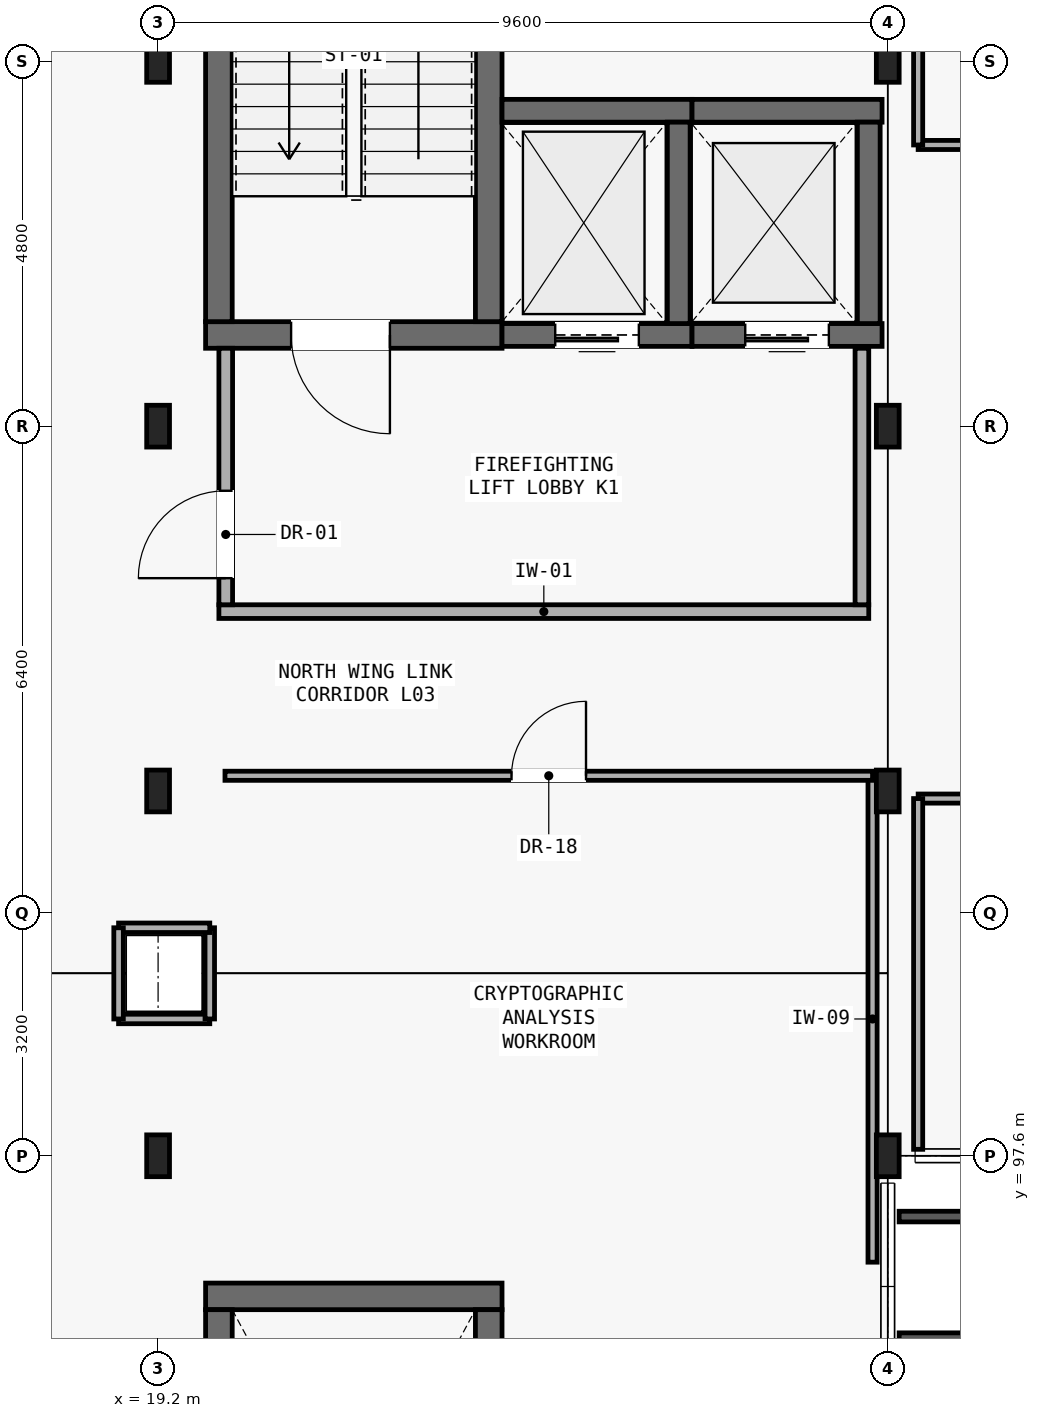
"""IFC4 building model, lengths in metres.
Left out: names, types, materials, properties, quantities, classifications, styles, units other than length and angle.
Written with IfcOpenShell. Run it as: python <this file> out.ifc"""

import sys

from ifc_helpers import new_model, si_unit, direction, frame, frame_2d, origin, origin_2d, place, context, subcontext, project, spatial, rectangle, i_section, extrude, element, fill, save


model = new_model("IFC4")
c1 = context("Model", 3, precision=1e-05, world=origin(), true_north=direction((0.0, 1.0)))
c2 = subcontext(c1, "Body", "Model", "MODEL_VIEW")
j1 = project(units=[si_unit("LENGTHUNIT", "METRE"), si_unit("PLANEANGLEUNIT", "RADIAN")], contexts=[c1])
p1 = place(None, origin())
s1 = spatial("IfcSite", under=j1, at=p1, CompositionType="ELEMENT")
p2 = place(p1, origin())
s2 = spatial("IfcBuilding", under=s1, at=p2, CompositionType="ELEMENT")
p3 = place(p2, frame((0.0, 0.0, 13.65)))
s3 = spatial("IfcBuildingStorey", under=s2, at=p3, CompositionType="ELEMENT", Elevation=13.65)
for number, where, z_axis, x_axis in (
    (1, (28.8, 97.6, 0.0), (0.0, 0.0, 1.0), (1.0, 0.0, 0.0)),
    (2, (28.8, 102.4, 0.0), (0.0, 0.0, 1.0), (1.0, 0.0, 0.0)),
    (3, (28.8, 107.2, 0.0), (0.0, 0.0, 1.0), (1.0, 0.0, 0.0)),
    (4, (28.8, 112.0, 0.0), (0.0, 0.0, 1.0), (1.0, 0.0, 0.0)),
    (5, (19.2, 97.6, 0.0), (0.0, 0.0, 1.0), (1.0, 0.0, 0.0)),
    (6, (19.2, 102.4, 0.0), (0.0, 0.0, 1.0), (1.0, 0.0, 0.0)),
    (7, (19.2, 107.2, 0.0), (0.0, 0.0, 1.0), (1.0, 0.0, 0.0)),
    (8, (19.2, 112.0, 0.0), (0.0, 0.0, 1.0), (1.0, 0.0, 0.0)),
):
    element("IfcColumn", number, at=place(p3, frame(where, z_axis=z_axis, x_axis=x_axis)), inside=s3, PredefinedType="COLUMN", context=c2, shape_type="SweptSolid", body=[
        extrude(i_section(OverallWidth=0.3, OverallDepth=0.55, WebThickness=0.015, FlangeThickness=0.029, FilletRadius=0.027, at=origin_2d()), origin(), (0.0, 0.0, 1.0), 4.2),
    ])
p4 = place(p3, frame((19.825, 108.4, 0.0), z_axis=(0.0, 0.0, 1.0), x_axis=(1.0, 0.0, 0.0)))
e9 = element("IfcWall", 9, at=p4, inside=s3, PredefinedType="SHEAR", context=c2, shape_type="SweptSolid", body=[
    extrude(rectangle(XDim=3.9, YDim=0.35, at=frame_2d((1.95, 0.0))), origin(), (0.0, 0.0, 1.0), 3.98),
])
p5 = place(p4, frame((1.125, 0.0, 0.0)))
e10 = element("IfcOpeningElement", 10, at=p5, cuts=e9, PredefinedType="OPENING", context=c2, shape_type="SweptSolid", body=[
    extrude(rectangle(XDim=1.3, YDim=2.15, at=frame_2d((0.65, 1.075))), frame((0.0, 0.185, 0.0), z_axis=(0.0, -1.0, 0.0), x_axis=(1.0, 0.0, 0.0)), (0.0, 0.0, 1.0), 0.37),
])
for number, where, z_axis, x_axis in (
    (11, (20.0, 108.575, 0.0), (0.0, 0.0, 1.0), (0.0, 1.0, 0.0)),
    (12, (23.55, 108.575, 0.0), (0.0, 0.0, 1.0), (0.0, 1.0, 0.0)),
):
    element("IfcWall", number, at=place(p3, frame(where, z_axis=z_axis, x_axis=x_axis)), inside=s3, PredefinedType="SHEAR", context=c2, shape_type="SweptSolid", body=[
        extrude(rectangle(XDim=7.6, YDim=0.35, at=frame_2d((3.8, 0.0))), origin(), (0.0, 0.0, 1.0), 3.98),
    ])
p6 = place(p3, frame((23.725, 108.4, 0.0), z_axis=(0.0, 0.0, 1.0), x_axis=(1.0, 0.0, 0.0)))
e13 = element("IfcWall", 13, at=p6, inside=s3, PredefinedType="SHEAR", context=c2, shape_type="SweptSolid", body=[
    extrude(rectangle(XDim=2.5, YDim=0.3, at=frame_2d((1.25, 0.0))), origin(), (0.0, 0.0, 1.0), 3.98),
])
p7 = place(p6, frame((0.7, 0.0, 0.0)))
e14 = element("IfcOpeningElement", 14, at=p7, cuts=e13, PredefinedType="OPENING", context=c2, shape_type="SweptSolid", body=[
    extrude(rectangle(XDim=1.1, YDim=2.1, at=frame_2d((0.55, 1.05))), frame((0.0, 0.16, 0.0), z_axis=(0.0, -1.0, 0.0), x_axis=(1.0, 0.0, 0.0)), (0.0, 0.0, 1.0), 0.32),
])
p8 = place(p3, frame((23.725, 111.35, 0.0), z_axis=(0.0, 0.0, 1.0), x_axis=(1.0, 0.0, 0.0)))
e15 = element("IfcWall", 15, at=p8, inside=s3, PredefinedType="SHEAR", context=c2, shape_type="SweptSolid", body=[
    extrude(rectangle(XDim=2.5, YDim=0.3, at=frame_2d((1.25, 0.0))), origin(), (0.0, 0.0, 1.0), 3.98),
])
p9 = place(p3, frame((26.05, 108.55, 0.0), z_axis=(0.0, 0.0, 1.0), x_axis=(0.0, 1.0, 0.0)))
e16 = element("IfcWall", 16, at=p9, inside=s3, PredefinedType="SHEAR", context=c2, shape_type="SweptSolid", body=[
    extrude(rectangle(XDim=2.65, YDim=0.3, at=frame_2d((1.325, 0.0))), origin(), (0.0, 0.0, 1.0), 3.98),
])
p10 = place(p3, frame((26.225, 108.4, 0.0), z_axis=(0.0, 0.0, 1.0), x_axis=(1.0, 0.0, 0.0)))
e17 = element("IfcWall", 17, at=p10, inside=s3, PredefinedType="SHEAR", context=c2, shape_type="SweptSolid", body=[
    extrude(rectangle(XDim=2.5, YDim=0.3, at=frame_2d((1.25, 0.0))), origin(), (0.0, 0.0, 1.0), 3.98),
])
p11 = place(p10, frame((0.7, 0.0, 0.0)))
e18 = element("IfcOpeningElement", 18, at=p11, cuts=e17, PredefinedType="OPENING", context=c2, shape_type="SweptSolid", body=[
    extrude(rectangle(XDim=1.1, YDim=2.1, at=frame_2d((0.55, 1.05))), frame((0.0, 0.16, 0.0), z_axis=(0.0, -1.0, 0.0), x_axis=(1.0, 0.0, 0.0)), (0.0, 0.0, 1.0), 0.32),
])
p12 = place(p3, frame((26.225, 111.35, 0.0), z_axis=(0.0, 0.0, 1.0), x_axis=(1.0, 0.0, 0.0)))
e19 = element("IfcWall", 19, at=p12, inside=s3, PredefinedType="SHEAR", context=c2, shape_type="SweptSolid", body=[
    extrude(rectangle(XDim=2.5, YDim=0.3, at=frame_2d((1.25, 0.0))), origin(), (0.0, 0.0, 1.0), 3.98),
])
p13 = place(p3, frame((28.55, 108.55, 0.0), z_axis=(0.0, 0.0, 1.0), x_axis=(0.0, 1.0, 0.0)))
e20 = element("IfcWall", 20, at=p13, inside=s3, PredefinedType="SHEAR", context=c2, shape_type="SweptSolid", body=[
    extrude(rectangle(XDim=2.65, YDim=0.3, at=frame_2d((1.325, 0.0))), origin(), (0.0, 0.0, 1.0), 3.98),
])
p14 = place(p3, frame((20.0, 104.76, 0.0), z_axis=(0.0, 0.0, 1.0), x_axis=(1.0, 0.0, 0.0)))
e21 = element("IfcWall", 21, at=p14, inside=s3, PredefinedType="PARTITIONING", context=c2, shape_type="SweptSolid", body=[
    extrude(rectangle(XDim=8.55, YDim=0.18, at=frame_2d((4.275, 0.0))), origin(), (0.0, 0.0, 1.0), 3.46),
])
p15 = place(p3, frame((20.09, 104.85, 0.0), z_axis=(0.0, 0.0, 1.0), x_axis=(0.0, 1.0, 0.0)))
e22 = element("IfcWall", 22, at=p15, inside=s3, PredefinedType="PARTITIONING", context=c2, shape_type="SweptSolid", body=[
    extrude(rectangle(XDim=3.375, YDim=0.18, at=frame_2d((1.688, 0.0))), origin(), (0.0, 0.0, 1.0), 3.98),
])
p16 = place(p15, frame((0.35, 0.0, 0.0)))
e23 = element("IfcOpeningElement", 23, at=p16, cuts=e22, PredefinedType="OPENING", context=c2, shape_type="SweptSolid", body=[
    extrude(rectangle(XDim=1.15, YDim=2.15, at=frame_2d((0.575, 1.075))), frame((0.0, 0.1, 0.0), z_axis=(0.0, -1.0, 0.0), x_axis=(1.0, 0.0, 0.0)), (0.0, 0.0, 1.0), 0.2),
])
p17 = place(p3, frame((28.46, 104.85, 0.0), z_axis=(0.0, 0.0, 1.0), x_axis=(0.0, 1.0, 0.0)))
e24 = element("IfcWall", 24, at=p17, inside=s3, PredefinedType="PARTITIONING", context=c2, shape_type="SweptSolid", body=[
    extrude(rectangle(XDim=3.375, YDim=0.18, at=frame_2d((1.688, 0.0))), origin(), (0.0, 0.0, 1.0), 3.98),
])
p18 = place(p3, frame((19.825, 95.75, 0.0), z_axis=(0.0, 0.0, 1.0), x_axis=(1.0, 0.0, 0.0)))
e25 = element("IfcWall", 25, at=p18, inside=s3, PredefinedType="SHEAR", context=c2, shape_type="SweptSolid", body=[
    extrude(rectangle(XDim=3.9, YDim=0.35, at=frame_2d((1.95, 0.0))), origin(), (0.0, 0.0, 1.0), 3.98),
])
for number, where, z_axis, x_axis in (
    (26, (20.0, 87.975, 0.0), (0.0, 0.0, 1.0), (0.0, 1.0, 0.0)),
    (27, (23.55, 87.975, 0.0), (0.0, 0.0, 1.0), (0.0, 1.0, 0.0)),
):
    element("IfcWall", number, at=place(p3, frame(where, z_axis=z_axis, x_axis=x_axis)), inside=s3, PredefinedType="SHEAR", context=c2, shape_type="SweptSolid", body=[
        extrude(rectangle(XDim=7.6, YDim=0.35, at=frame_2d((3.8, 0.0))), origin(), (0.0, 0.0, 1.0), 3.98),
    ])
p19 = place(p3, frame((18.68, 99.4, 0.0), z_axis=(0.0, 0.0, 1.0), x_axis=(1.0, 0.0, 0.0)))
e28 = element("IfcWall", 28, at=p19, inside=s3, PredefinedType="PARTITIONING", context=c2, shape_type="SweptSolid", body=[
    extrude(rectangle(XDim=1.2, YDim=0.125, at=frame_2d((0.6, 0.0))), origin(), (0.0, 0.0, 1.0), 3.98),
])
p20 = place(p3, frame((19.88, 99.4, 0.0), z_axis=(0.0, 0.0, 1.0), x_axis=(0.0, 1.0, 0.0)))
e29 = element("IfcWall", 29, at=p20, inside=s3, PredefinedType="PARTITIONING", context=c2, shape_type="SweptSolid", body=[
    extrude(rectangle(XDim=1.2, YDim=0.125, at=frame_2d((0.6, 0.0))), origin(), (0.0, 0.0, 1.0), 3.98),
])
p21 = place(p3, frame((19.88, 100.6, 0.0), z_axis=(0.0, 0.0, 1.0), x_axis=(-1.0, 0.0, 0.0)))
e30 = element("IfcWall", 30, at=p21, inside=s3, PredefinedType="PARTITIONING", context=c2, shape_type="SweptSolid", body=[
    extrude(rectangle(XDim=1.2, YDim=0.125, at=frame_2d((0.6, 0.0))), origin(), (0.0, 0.0, 1.0), 3.98),
])
p22 = place(p3, frame((18.68, 100.6, 0.0), z_axis=(0.0, 0.0, 1.0), x_axis=(0.0, -1.0, 0.0)))
e31 = element("IfcWall", 31, at=p22, inside=s3, PredefinedType="PARTITIONING", context=c2, shape_type="SweptSolid", body=[
    extrude(rectangle(XDim=1.2, YDim=0.125, at=frame_2d((0.6, 0.0))), origin(), (0.0, 0.0, 1.0), 3.98),
])
p23 = place(p3, frame((28.6, 96.2, 0.0), z_axis=(0.0, 0.0, 1.0), x_axis=(0.0, 1.0, 0.0)))
e32 = element("IfcWall", 32, at=p23, inside=s3, PredefinedType="PARTITIONING", context=c2, shape_type="SweptSolid", body=[
    extrude(rectangle(XDim=6.4, YDim=0.12, at=frame_2d((3.2, 0.0))), origin(), (0.0, 0.0, 1.0), 3.42),
])
p24 = place(p3, frame((28.6, 102.6, 0.0), z_axis=(0.0, 0.0, 1.0), x_axis=(-1.0, 0.0, 0.0)))
e33 = element("IfcWall", 33, at=p24, inside=s3, PredefinedType="PARTITIONING", context=c2, shape_type="SweptSolid", body=[
    extrude(rectangle(XDim=8.52, YDim=0.12, at=frame_2d((4.26, 0.0))), origin(), (0.0, 0.0, 1.0), 3.16),
])
p25 = place(p24, frame((3.77, 0.0, 0.0)))
e34 = element("IfcOpeningElement", 34, at=p25, cuts=e33, PredefinedType="OPENING", context=c2, shape_type="SweptSolid", body=[
    extrude(rectangle(XDim=0.98, YDim=2.1, at=frame_2d((0.49, 1.05))), frame((0.0, 0.07, 0.0), z_axis=(0.0, -1.0, 0.0), x_axis=(1.0, 0.0, 0.0)), (0.0, 0.0, 1.0), 0.14),
])
p26 = place(p3, frame((29.2, 110.9, 0.0), z_axis=(0.0, 0.0, 1.0), x_axis=(1.0, 0.0, 0.0)))
e35 = element("IfcWall", 35, at=p26, inside=s3, PredefinedType="PARTITIONING", context=c2, shape_type="SweptSolid", body=[
    extrude(rectangle(XDim=28.4, YDim=0.12, at=frame_2d((14.2, 0.0))), origin(), (0.0, 0.0, 1.0), 3.98),
])
p27 = place(p26, frame((13.69, 0.0, 0.0)))
e36 = element("IfcOpeningElement", 36, at=p27, cuts=e35, PredefinedType="OPENING", context=c2, shape_type="SweptSolid", body=[
    extrude(rectangle(XDim=1.02, YDim=2.1, at=frame_2d((0.51, 1.05))), frame((0.0, 0.07, 0.0), z_axis=(0.0, -1.0, 0.0), x_axis=(1.0, 0.0, 0.0)), (0.0, 0.0, 1.0), 0.14),
])
p28 = place(p3, frame((29.2, 116.55, 0.0), z_axis=(0.0, 0.0, 1.0), x_axis=(0.0, -1.0, 0.0)))
e37 = element("IfcWall", 37, at=p28, inside=s3, PredefinedType="PARTITIONING", context=c2, shape_type="SweptSolid", body=[
    extrude(rectangle(XDim=5.65, YDim=0.12, at=frame_2d((2.825, 0.0))), origin(), (0.0, 0.0, 1.0), 3.98),
])
p29 = place(p3, frame((57.6, 102.3, 0.0), z_axis=(0.0, 0.0, 1.0), x_axis=(-1.0, 0.0, 0.0)))
e38 = element("IfcWall", 38, at=p29, inside=s3, PredefinedType="PARTITIONING", context=c2, shape_type="SweptSolid", body=[
    extrude(rectangle(XDim=28.4, YDim=0.12, at=frame_2d((14.2, 0.0))), origin(), (0.0, 0.0, 1.0), 3.98),
])
p30 = place(p29, frame((13.69, 0.0, 0.0)))
e39 = element("IfcOpeningElement", 39, at=p30, cuts=e38, PredefinedType="OPENING", context=c2, shape_type="SweptSolid", body=[
    extrude(rectangle(XDim=1.02, YDim=2.1, at=frame_2d((0.51, 1.05))), frame((0.0, 0.07, 0.0), z_axis=(0.0, -1.0, 0.0), x_axis=(1.0, 0.0, 0.0)), (0.0, 0.0, 1.0), 0.14),
])
p31 = place(p3, frame((29.2, 102.3, 0.0), z_axis=(0.0, 0.0, 1.0), x_axis=(0.0, -1.0, 0.0)))
e40 = element("IfcWall", 40, at=p31, inside=s3, PredefinedType="PARTITIONING", context=c2, shape_type="SweptSolid", body=[
    extrude(rectangle(XDim=4.615, YDim=0.12, at=frame_2d((2.308, 0.0))), origin(), (0.0, 0.0, 1.0), 3.98),
])
p32 = place(p5, frame((1.3, 0.0, 0.0), z_axis=(0.0, 0.0, 1.0), x_axis=(-1.0, 0.0, 0.0)))
e41 = element("IfcDoor", 41, at=p32, inside=s3, OperationType="SINGLE_SWING_RIGHT", PredefinedType="DOOR", context=c2, shape_type="SweptSolid", body=[
    extrude(rectangle(XDim=1.3, YDim=2.15, at=frame_2d((0.65, 1.075))), frame((0.0, 0.025, 0.0), z_axis=(0.0, -1.0, 0.0), x_axis=(1.0, 0.0, 0.0)), (0.0, 0.0, 1.0), 0.05),
])
fill(e10, e41)
p33 = place(p7, frame((1.1, 0.0, 0.0), z_axis=(0.0, 0.0, 1.0), x_axis=(-1.0, 0.0, 0.0)))
e42 = element("IfcDoor", 42, at=p33, inside=s3, OperationType="SLIDING_TO_LEFT", PredefinedType="DOOR", context=c2, shape_type="SweptSolid", body=[
    extrude(rectangle(XDim=1.1, YDim=2.1, at=frame_2d((0.55, 1.05))), frame((0.0, 0.025, 0.0), z_axis=(0.0, -1.0, 0.0), x_axis=(1.0, 0.0, 0.0)), (0.0, 0.0, 1.0), 0.05),
])
fill(e14, e42)
p34 = place(p11, frame((1.1, 0.0, 0.0), z_axis=(0.0, 0.0, 1.0), x_axis=(-1.0, 0.0, 0.0)))
e43 = element("IfcDoor", 43, at=p34, inside=s3, OperationType="SLIDING_TO_LEFT", PredefinedType="DOOR", context=c2, shape_type="SweptSolid", body=[
    extrude(rectangle(XDim=1.1, YDim=2.1, at=frame_2d((0.55, 1.05))), frame((0.0, 0.025, 0.0), z_axis=(0.0, -1.0, 0.0), x_axis=(1.0, 0.0, 0.0)), (0.0, 0.0, 1.0), 0.05),
])
fill(e18, e43)
p35 = place(p16, origin())
e44 = element("IfcDoor", 44, at=p35, inside=s3, OperationType="SINGLE_SWING_LEFT", PredefinedType="DOOR", context=c2, shape_type="SweptSolid", body=[
    extrude(rectangle(XDim=1.15, YDim=2.15, at=frame_2d((0.575, 1.075))), frame((0.0, 0.025, 0.0), z_axis=(0.0, -1.0, 0.0), x_axis=(1.0, 0.0, 0.0)), (0.0, 0.0, 1.0), 0.05),
])
fill(e23, e44)
p36 = place(p25, frame((0.98, 0.0, 0.0), z_axis=(0.0, 0.0, 1.0), x_axis=(-1.0, 0.0, 0.0)))
e45 = element("IfcDoor", 45, at=p36, inside=s3, OperationType="SINGLE_SWING_LEFT", PredefinedType="DOOR", context=c2, shape_type="SweptSolid", body=[
    extrude(rectangle(XDim=0.98, YDim=2.1, at=frame_2d((0.49, 1.05))), frame((0.0, 0.025, 0.0), z_axis=(0.0, -1.0, 0.0), x_axis=(1.0, 0.0, 0.0)), (0.0, 0.0, 1.0), 0.05),
])
fill(e34, e45)
save(model, sys.argv[1])
